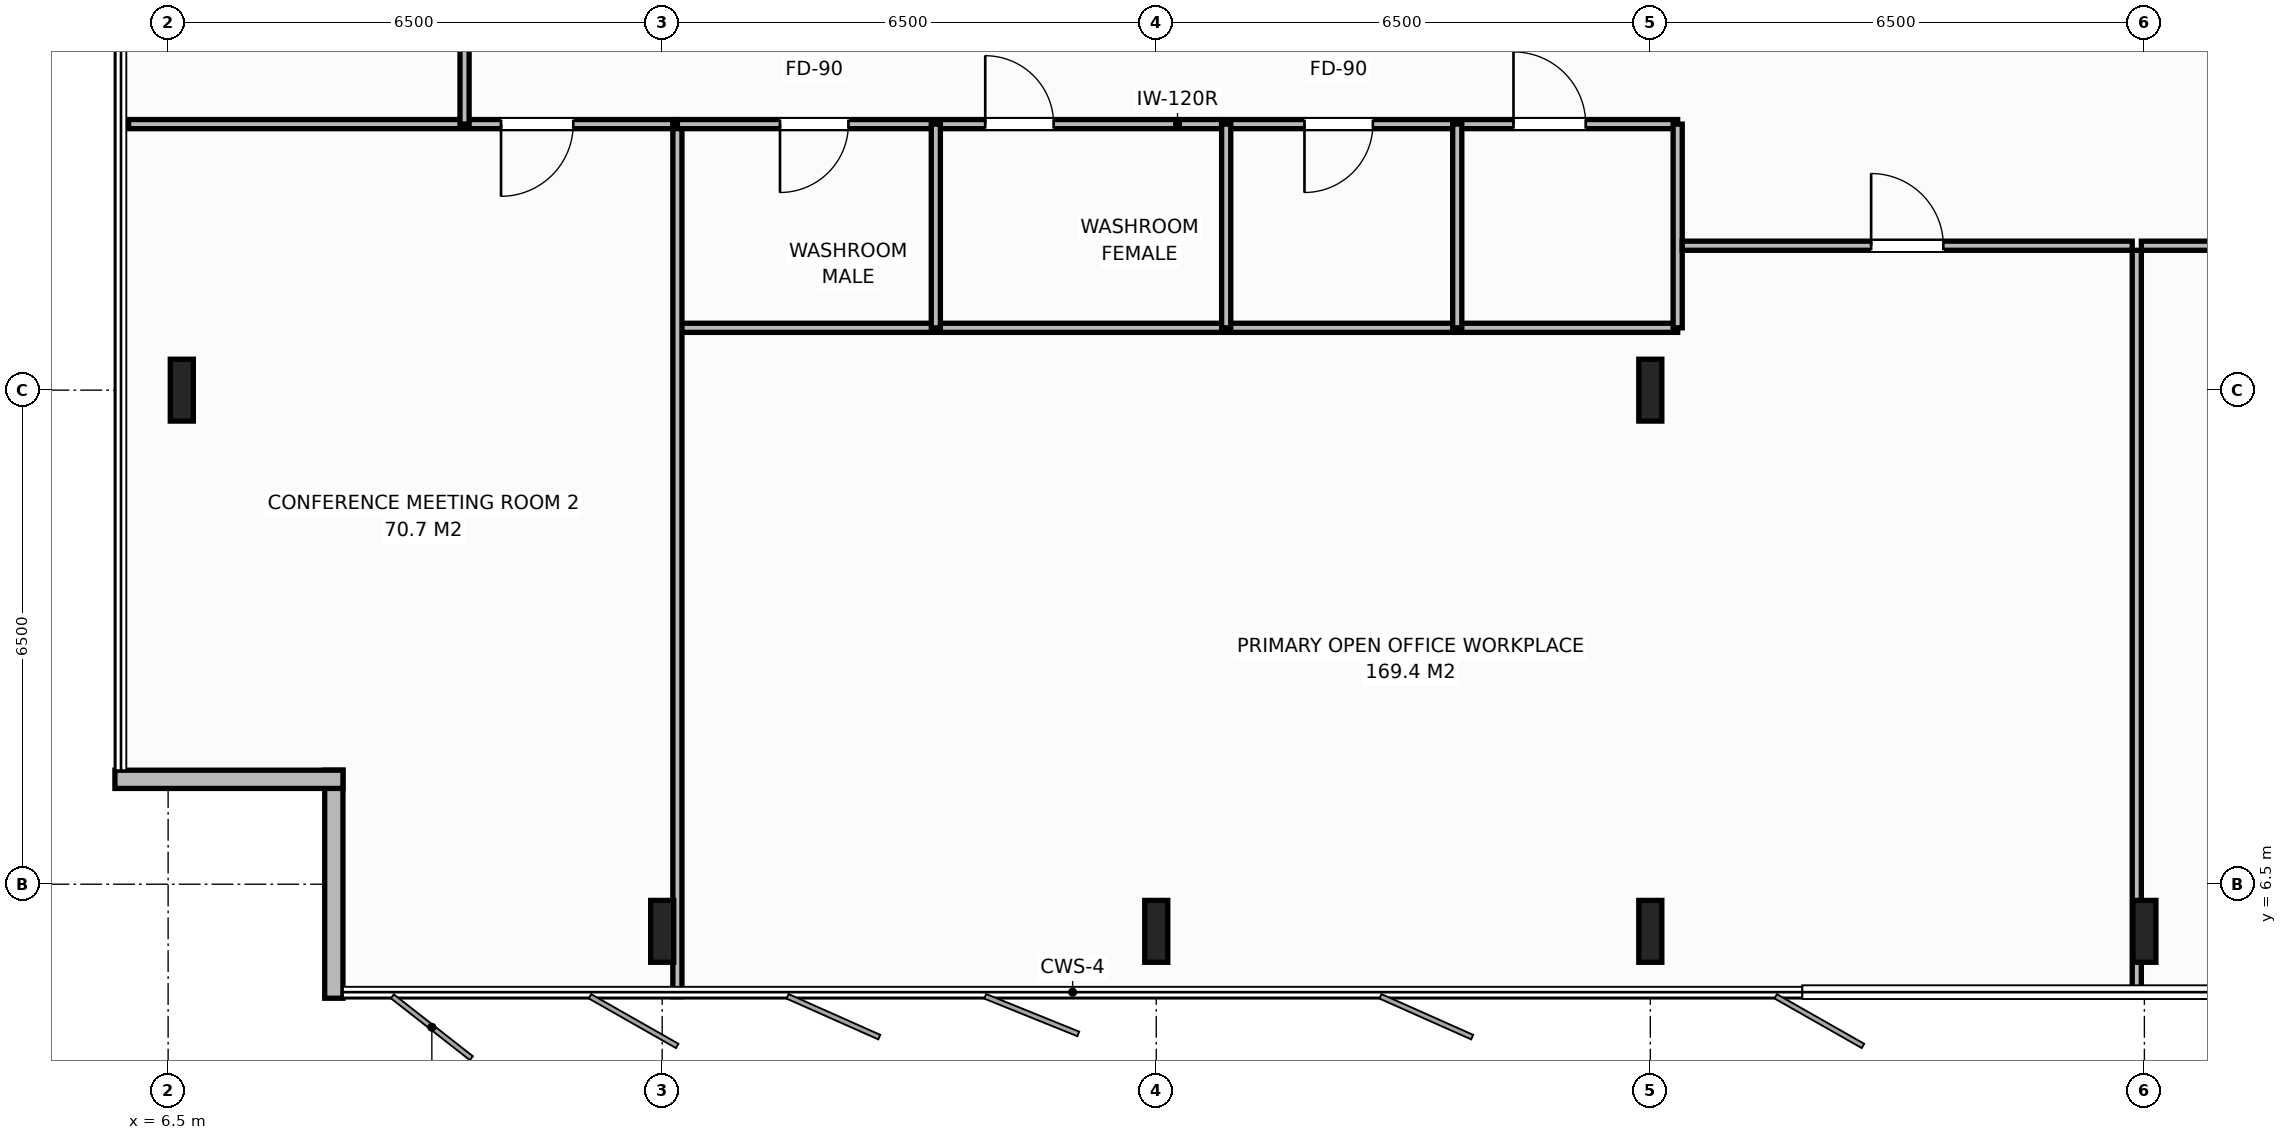
"""IFC4 building model, lengths in metres.
Left out: names, types, materials, properties, quantities, classifications, styles, units other than length and angle.
Written with IfcOpenShell. Run it as: python <this file> out.ifc"""

import sys

from ifc_helpers import new_model, si_unit, direction, frame, frame_2d, origin, origin_2d, place, context, subcontext, project, spatial, rectangle, i_section, extrude, element, fill, save


model = new_model("IFC4")
c1 = context("Model", 3, precision=1e-05, world=origin(), true_north=direction((0.0, 1.0)))
c2 = subcontext(c1, "Body", "Model", "MODEL_VIEW")
j1 = project(units=[si_unit("LENGTHUNIT", "METRE"), si_unit("PLANEANGLEUNIT", "RADIAN")], contexts=[c1])
p1 = place(None, origin())
s1 = spatial("IfcSite", under=j1, at=p1, CompositionType="ELEMENT")
p2 = place(p1, origin())
s2 = spatial("IfcBuilding", under=s1, at=p2, CompositionType="ELEMENT")
p3 = place(p2, frame((0.0, 0.0, 240.4)))
s3 = spatial("IfcBuildingStorey", under=s2, at=p3, CompositionType="ELEMENT", Elevation=240.4)
for number, where, z_axis, x_axis in (
    (1, (26.0, 13.0, 0.0), (0.0, 0.0, 1.0), (1.0, 0.0, 0.0)),
    (2, (13.0, 5.88, 0.0), (0.0, 0.0, 1.0), (1.0, 0.0, 0.0)),
    (3, (19.5, 5.88, 0.0), (0.0, 0.0, 1.0), (1.0, 0.0, 0.0)),
    (4, (26.0, 5.88, 0.0), (0.0, 0.0, 1.0), (1.0, 0.0, 0.0)),
    (5, (32.5, 5.88, 0.0), (0.0, 0.0, 1.0), (1.0, 0.0, 0.0)),
    (6, (6.68, 13.0, 0.0), (0.0, 0.0, 1.0), (1.0, 0.0, 0.0)),
):
    element("IfcColumn", number, at=place(p3, frame(where, z_axis=z_axis, x_axis=x_axis)), inside=s3, PredefinedType="COLUMN", context=c2, shape_type="SweptSolid", body=[
        extrude(i_section(OverallWidth=0.303, OverallDepth=0.814, WebThickness=0.021, FlangeThickness=0.04, at=origin_2d()), origin(), (0.0, 0.0, 1.0), 3.8),
    ])
for number, where, z_axis, x_axis in (
    (7, (8.68, 5.0, 0.0), (0.0, 0.0, 1.0), (0.0, 1.0, 0.0)),
    (8, (8.8, 7.88, 0.0), (0.0, 0.0, 1.0), (-1.0, 0.0, 0.0)),
):
    element("IfcWall", number, at=place(p3, frame(where, z_axis=z_axis, x_axis=x_axis)), inside=s3, PredefinedType="STANDARD", context=c2, shape_type="SweptSolid", body=[
        extrude(rectangle(XDim=3.0, YDim=0.24, at=frame_2d((1.5, 0.0))), origin(), (0.0, 0.0, 1.0), 3.58),
    ])
p4 = place(p3, frame((13.2, 16.5, 0.0), z_axis=(0.0, 0.0, 1.0), x_axis=(1.0, 0.0, 0.0)))
e9 = element("IfcWall", 9, at=p4, inside=s3, PredefinedType="PARTITIONING", context=c2, shape_type="SweptSolid", body=[
    extrude(rectangle(XDim=13.16, YDim=0.12, at=frame_2d((6.58, 0.0))), origin(), (0.0, 0.0, 1.0), 3.58),
])
p5 = place(p4, frame((1.35, 0.0, 0.0)))
e10 = element("IfcOpeningElement", 10, at=p5, cuts=e9, PredefinedType="OPENING", context=c2, shape_type="SweptSolid", body=[
    extrude(rectangle(XDim=0.9, YDim=2.15, at=frame_2d((0.45, 1.075))), frame((0.0, 0.07, 0.0), z_axis=(0.0, -1.0, 0.0), x_axis=(1.0, 0.0, 0.0)), (0.0, 0.0, 1.0), 0.14),
])
p6 = place(p4, frame((4.05, 0.0, 0.0)))
e11 = element("IfcOpeningElement", 11, at=p6, cuts=e9, PredefinedType="OPENING", context=c2, shape_type="SweptSolid", body=[
    extrude(rectangle(XDim=0.9, YDim=2.15, at=frame_2d((0.45, 1.075))), frame((0.0, 0.07, 0.0), z_axis=(0.0, -1.0, 0.0), x_axis=(1.0, 0.0, 0.0)), (0.0, 0.0, 1.0), 0.14),
])
p7 = place(p4, frame((8.25, 0.0, 0.0)))
e12 = element("IfcOpeningElement", 12, at=p7, cuts=e9, PredefinedType="OPENING", context=c2, shape_type="SweptSolid", body=[
    extrude(rectangle(XDim=0.9, YDim=2.15, at=frame_2d((0.45, 1.075))), frame((0.0, 0.07, 0.0), z_axis=(0.0, -1.0, 0.0), x_axis=(1.0, 0.0, 0.0)), (0.0, 0.0, 1.0), 0.14),
])
p8 = place(p4, frame((11.0, 0.0, 0.0)))
e13 = element("IfcOpeningElement", 13, at=p8, cuts=e9, PredefinedType="OPENING", context=c2, shape_type="SweptSolid", body=[
    extrude(rectangle(XDim=0.95, YDim=2.15, at=frame_2d((0.475, 1.075))), frame((0.0, 0.07, 0.0), z_axis=(0.0, -1.0, 0.0), x_axis=(1.0, 0.0, 0.0)), (0.0, 0.0, 1.0), 0.14),
])
p9 = place(p3, frame((13.2, 13.82, 0.0), z_axis=(0.0, 0.0, 1.0), x_axis=(1.0, 0.0, 0.0)))
e14 = element("IfcWall", 14, at=p9, inside=s3, PredefinedType="PARTITIONING", context=c2, shape_type="SweptSolid", body=[
    extrude(rectangle(XDim=13.16, YDim=0.12, at=frame_2d((6.58, 0.0))), origin(), (0.0, 0.0, 1.0), 3.58),
])
for number, where, z_axis, x_axis in (
    (15, (16.6, 13.82, 0.0), (0.0, 0.0, 1.0), (0.0, 1.0, 0.0)),
    (16, (20.42, 13.82, 0.0), (0.0, 0.0, 1.0), (0.0, 1.0, 0.0)),
    (17, (23.46, 13.82, 0.0), (0.0, 0.0, 1.0), (0.0, 1.0, 0.0)),
    (18, (26.36, 13.82, 0.0), (0.0, 0.0, 1.0), (0.0, 1.0, 0.0)),
):
    element("IfcWall", number, at=place(p3, frame(where, z_axis=z_axis, x_axis=x_axis)), inside=s3, PredefinedType="PARTITIONING", context=c2, shape_type="SweptSolid", body=[
        extrude(rectangle(XDim=2.68, YDim=0.12, at=frame_2d((1.34, 0.0))), origin(), (0.0, 0.0, 1.0), 3.58),
    ])
p10 = place(p3, frame((13.2, 5.02, 0.0), z_axis=(0.0, 0.0, 1.0), x_axis=(0.0, 1.0, 0.0)))
e19 = element("IfcWall", 19, at=p10, inside=s3, PredefinedType="PARTITIONING", context=c2, shape_type="SweptSolid", body=[
    extrude(rectangle(XDim=11.42, YDim=0.12, at=frame_2d((5.71, 0.0))), origin(), (0.0, 0.0, 1.0), 2.88),
])
p11 = place(p3, frame((5.98, 16.5, 0.0), z_axis=(0.0, 0.0, 1.0), x_axis=(1.0, 0.0, 0.0)))
e20 = element("IfcWall", 20, at=p11, inside=s3, PredefinedType="PARTITIONING", context=c2, shape_type="SweptSolid", body=[
    extrude(rectangle(XDim=7.16, YDim=0.12, at=frame_2d((3.58, 0.0))), origin(), (0.0, 0.0, 1.0), 3.58),
])
p12 = place(p11, frame((4.9, 0.0, 0.0)))
e21 = element("IfcOpeningElement", 21, at=p12, cuts=e20, PredefinedType="OPENING", context=c2, shape_type="SweptSolid", body=[
    extrude(rectangle(XDim=0.95, YDim=2.15, at=frame_2d((0.475, 1.075))), frame((0.0, 0.07, 0.0), z_axis=(0.0, -1.0, 0.0), x_axis=(1.0, 0.0, 0.0)), (0.0, 0.0, 1.0), 0.14),
])
p13 = place(p3, frame((32.4, 5.02, 0.0), z_axis=(0.0, 0.0, 1.0), x_axis=(0.0, 1.0, 0.0)))
e22 = element("IfcWall", 22, at=p13, inside=s3, PredefinedType="PARTITIONING", context=c2, shape_type="SweptSolid", body=[
    extrude(rectangle(XDim=9.82, YDim=0.12, at=frame_2d((4.91, 0.0))), origin(), (0.0, 0.0, 1.0), 2.88),
])
p14 = place(p3, frame((26.42, 14.9, 0.0), z_axis=(0.0, 0.0, 1.0), x_axis=(1.0, 0.0, 0.0)))
e23 = element("IfcWall", 23, at=p14, inside=s3, PredefinedType="PARTITIONING", context=c2, shape_type="SweptSolid", body=[
    extrude(rectangle(XDim=5.92, YDim=0.12, at=frame_2d((2.96, 0.0))), origin(), (0.0, 0.0, 1.0), 3.58),
])
p15 = place(p14, frame((2.485, 0.0, 0.0)))
e24 = element("IfcOpeningElement", 24, at=p15, cuts=e23, PredefinedType="OPENING", context=c2, shape_type="SweptSolid", body=[
    extrude(rectangle(XDim=0.95, YDim=2.15, at=frame_2d((0.475, 1.075))), frame((0.0, 0.07, 0.0), z_axis=(0.0, -1.0, 0.0), x_axis=(1.0, 0.0, 0.0)), (0.0, 0.0, 1.0), 0.14),
])
p16 = place(p3, frame((32.46, 14.9, 0.0), z_axis=(0.0, 0.0, 1.0), x_axis=(1.0, 0.0, 0.0)))
e25 = element("IfcWall", 25, at=p16, inside=s3, PredefinedType="PARTITIONING", context=c2, shape_type="SweptSolid", body=[
    extrude(rectangle(XDim=5.07, YDim=0.12, at=frame_2d((2.535, 0.0))), origin(), (0.0, 0.0, 1.0), 3.58),
])
p17 = place(p16, frame((2.06, 0.0, 0.0)))
e26 = element("IfcOpeningElement", 26, at=p17, cuts=e25, PredefinedType="OPENING", context=c2, shape_type="SweptSolid", body=[
    extrude(rectangle(XDim=0.95, YDim=2.15, at=frame_2d((0.475, 1.075))), frame((0.0, 0.07, 0.0), z_axis=(0.0, -1.0, 0.0), x_axis=(1.0, 0.0, 0.0)), (0.0, 0.0, 1.0), 0.14),
])
p18 = place(p3, frame((10.4, 16.5, 0.0), z_axis=(0.0, 0.0, 1.0), x_axis=(0.0, 1.0, 0.0)))
e27 = element("IfcWall", 27, at=p18, inside=s3, PredefinedType="PARTITIONING", context=c2, shape_type="SweptSolid", body=[
    extrude(rectangle(XDim=19.0, YDim=0.12, at=frame_2d((9.5, 0.0))), origin(), (0.0, 0.0, 1.0), 3.58),
])
p19 = place(p18, frame((9.025, 0.0, 0.0)))
e28 = element("IfcOpeningElement", 28, at=p19, cuts=e27, PredefinedType="OPENING", context=c2, shape_type="SweptSolid", body=[
    extrude(rectangle(XDim=0.95, YDim=2.15, at=frame_2d((0.475, 1.075))), frame((0.0, 0.07, 0.0), z_axis=(0.0, -1.0, 0.0), x_axis=(1.0, 0.0, 0.0)), (0.0, 0.0, 1.0), 0.14),
])
p20 = place(p5, origin())
e29 = element("IfcDoor", 29, at=p20, inside=s3, OperationType="SINGLE_SWING_RIGHT", PredefinedType="DOOR", context=c2, shape_type="SweptSolid", body=[
    extrude(rectangle(XDim=0.9, YDim=2.15, at=frame_2d((0.45, 1.075))), frame((0.0, 0.025, 0.0), z_axis=(0.0, -1.0, 0.0), x_axis=(1.0, 0.0, 0.0)), (0.0, 0.0, 1.0), 0.05),
])
fill(e10, e29)
p21 = place(p6, origin())
e30 = element("IfcDoor", 30, at=p21, inside=s3, OperationType="SINGLE_SWING_LEFT", PredefinedType="DOOR", context=c2, shape_type="SweptSolid", body=[
    extrude(rectangle(XDim=0.9, YDim=2.15, at=frame_2d((0.45, 1.075))), frame((0.0, 0.025, 0.0), z_axis=(0.0, -1.0, 0.0), x_axis=(1.0, 0.0, 0.0)), (0.0, 0.0, 1.0), 0.05),
])
fill(e11, e30)
p22 = place(p7, origin())
e31 = element("IfcDoor", 31, at=p22, inside=s3, OperationType="SINGLE_SWING_RIGHT", PredefinedType="DOOR", context=c2, shape_type="SweptSolid", body=[
    extrude(rectangle(XDim=0.9, YDim=2.15, at=frame_2d((0.45, 1.075))), frame((0.0, 0.025, 0.0), z_axis=(0.0, -1.0, 0.0), x_axis=(1.0, 0.0, 0.0)), (0.0, 0.0, 1.0), 0.05),
])
fill(e12, e31)
p23 = place(p8, origin())
e32 = element("IfcDoor", 32, at=p23, inside=s3, OperationType="SINGLE_SWING_LEFT", PredefinedType="DOOR", context=c2, shape_type="SweptSolid", body=[
    extrude(rectangle(XDim=0.95, YDim=2.15, at=frame_2d((0.475, 1.075))), frame((0.0, 0.025, 0.0), z_axis=(0.0, -1.0, 0.0), x_axis=(1.0, 0.0, 0.0)), (0.0, 0.0, 1.0), 0.05),
])
fill(e13, e32)
p24 = place(p12, origin())
e33 = element("IfcDoor", 33, at=p24, inside=s3, OperationType="SINGLE_SWING_RIGHT", PredefinedType="DOOR", context=c2, shape_type="SweptSolid", body=[
    extrude(rectangle(XDim=0.95, YDim=2.15, at=frame_2d((0.475, 1.075))), frame((0.0, 0.025, 0.0), z_axis=(0.0, -1.0, 0.0), x_axis=(1.0, 0.0, 0.0)), (0.0, 0.0, 1.0), 0.05),
])
fill(e21, e33)
p25 = place(p15, origin())
e34 = element("IfcDoor", 34, at=p25, inside=s3, OperationType="SINGLE_SWING_LEFT", PredefinedType="DOOR", context=c2, shape_type="SweptSolid", body=[
    extrude(rectangle(XDim=0.95, YDim=2.15, at=frame_2d((0.475, 1.075))), frame((0.0, 0.025, 0.0), z_axis=(0.0, -1.0, 0.0), x_axis=(1.0, 0.0, 0.0)), (0.0, 0.0, 1.0), 0.05),
])
fill(e24, e34)
save(model, sys.argv[1])
